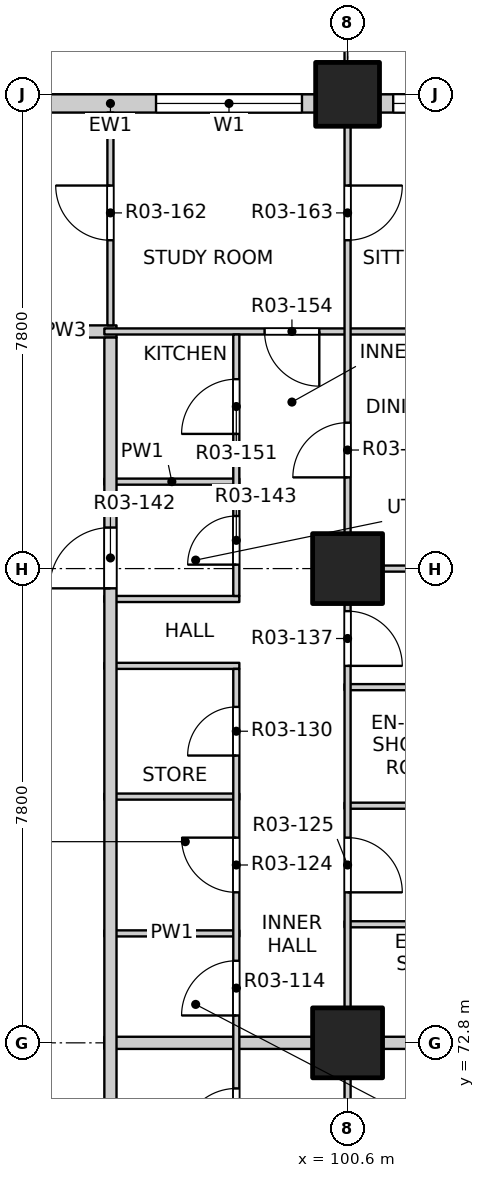
"""IFC4 building model, lengths in metres.
Left out: names, types, materials, properties, quantities, classifications, styles, units other than length and angle.
Written with IfcOpenShell. Run it as: python <this file> out.ifc"""

import sys

from ifc_helpers import new_model, si_unit, direction, frame, frame_2d, origin, origin_2d, place, context, subcontext, project, spatial, rectangle, extrude, element, fill, save


model = new_model("IFC4")
c1 = context("Model", 3, precision=1e-05, world=origin(), true_north=direction((0.0, 1.0)))
c2 = subcontext(c1, "Body", "Model", "MODEL_VIEW")
j1 = project(units=[si_unit("LENGTHUNIT", "METRE"), si_unit("PLANEANGLEUNIT", "RADIAN")], contexts=[c1])
p1 = place(None, origin())
s1 = spatial("IfcSite", under=j1, at=p1, CompositionType="ELEMENT")
p2 = place(p1, origin())
s2 = spatial("IfcBuilding", under=s1, at=p2, CompositionType="ELEMENT")
p3 = place(p2, frame((0.0, 0.0, 39.9)))
s3 = spatial("IfcBuildingStorey", under=s2, at=p3, CompositionType="ELEMENT", Elevation=39.9)
p4 = place(p3, frame((100.6, 88.4, -0.25), z_axis=(0.0, 0.0, 1.0), x_axis=(1.0, 0.0, 0.0)))
e1 = element("IfcColumn", 1, at=p4, inside=s3, PredefinedType="COLUMN", context=c2, shape_type="SweptSolid", body=[
    extrude(rectangle(XDim=1.05, YDim=1.05, at=origin_2d()), origin(), (0.0, 0.0, 1.0), 3.4),
])
for number, where, z_axis, x_axis in (
    (2, (100.6, 72.8, -0.25), (0.0, 0.0, 1.0), (1.0, 0.0, 0.0)),
    (3, (100.6, 80.6, -0.25), (0.0, 0.0, 1.0), (1.0, 0.0, 0.0)),
):
    element("IfcColumn", number, at=place(p3, frame(where, z_axis=z_axis, x_axis=x_axis)), inside=s3, PredefinedType="COLUMN", context=c2, shape_type="SweptSolid", body=[
        extrude(rectangle(XDim=1.15, YDim=1.15, at=origin_2d()), origin(), (0.0, 0.0, 1.0), 3.4),
    ])
p5 = place(p3, frame((93.325, 88.25, 0.0), z_axis=(0.0, 0.0, 1.0), x_axis=(1.0, 0.0, 0.0)))
e4 = element("IfcWall", 4, at=p5, inside=s3, PredefinedType="SOLIDWALL", context=c2, shape_type="SweptSolid", body=[
    extrude(rectangle(XDim=6.75, YDim=0.3, at=frame_2d((3.375, 0.0))), origin(), (0.0, 0.0, 1.0), 2.7),
])
p6 = place(p5, frame((0.525, 0.0, 0.0)))
e5 = element("IfcOpeningElement", 5, at=p6, cuts=e4, PredefinedType="OPENING", context=c2, shape_type="SweptSolid", body=[
    extrude(rectangle(XDim=1.8, YDim=2.4, at=frame_2d((0.9, 1.2))), frame((0.0, 0.16, 0.0), z_axis=(0.0, -1.0, 0.0), x_axis=(1.0, 0.0, 0.0)), (0.0, 0.0, 1.0), 0.32),
])
p7 = place(p5, frame((4.125, 0.0, 0.9)))
e6 = element("IfcOpeningElement", 6, at=p7, cuts=e4, PredefinedType="OPENING", context=c2, shape_type="SweptSolid", body=[
    extrude(rectangle(XDim=2.4, YDim=1.8, at=frame_2d((1.2, 0.9))), frame((0.0, 0.16, 0.0), z_axis=(0.0, -1.0, 0.0), x_axis=(1.0, 0.0, 0.0)), (0.0, 0.0, 1.0), 0.32),
])
p8 = place(p3, frame((101.125, 88.25, 0.0), z_axis=(0.0, 0.0, 1.0), x_axis=(1.0, 0.0, 0.0)))
e7 = element("IfcWall", 7, at=p8, inside=s3, PredefinedType="SOLIDWALL", context=c2, shape_type="SweptSolid", body=[
    extrude(rectangle(XDim=3.375, YDim=0.3, at=frame_2d((1.688, 0.0))), origin(), (0.0, 0.0, 1.0), 2.7),
])
p9 = place(p8, frame((0.225, 0.0, 0.9)))
e8 = element("IfcOpeningElement", 8, at=p9, cuts=e7, PredefinedType="OPENING", context=c2, shape_type="SweptSolid", body=[
    extrude(rectangle(XDim=2.4, YDim=1.8, at=frame_2d((1.2, 0.9))), frame((0.0, 0.16, 0.0), z_axis=(0.0, -1.0, 0.0), x_axis=(1.0, 0.0, 0.0)), (0.0, 0.0, 1.0), 0.32),
])
p10 = place(p3, frame((96.6, 72.8, 0.0), z_axis=(0.0, 0.0, 1.0), x_axis=(1.0, 0.0, 0.0)))
e9 = element("IfcWall", 9, at=p10, inside=s3, PredefinedType="PARTITIONING", context=c2, shape_type="SweptSolid", body=[
    extrude(rectangle(XDim=4.0, YDim=0.2, at=frame_2d((2.0, 0.0))), origin(), (0.0, 0.0, 1.0), 3.15),
])
p11 = place(p3, frame((100.6, 72.8, 0.0), z_axis=(0.0, 0.0, 1.0), x_axis=(1.0, 0.0, 0.0)))
e10 = element("IfcWall", 10, at=p11, inside=s3, PredefinedType="PARTITIONING", context=c2, shape_type="SweptSolid", body=[
    extrude(rectangle(XDim=7.5, YDim=0.2, at=frame_2d((3.75, 0.0))), origin(), (0.0, 0.0, 1.0), 2.55),
])
p12 = place(p3, frame((96.6, 74.6, 0.0), z_axis=(0.0, 0.0, 1.0), x_axis=(1.0, 0.0, 0.0)))
e11 = element("IfcWall", 11, at=p12, inside=s3, PredefinedType="PARTITIONING", context=c2, shape_type="SweptSolid", body=[
    extrude(rectangle(XDim=2.22, YDim=0.1, at=frame_2d((1.11, 0.0))), origin(), (0.0, 0.0, 1.0), 3.15),
])
p13 = place(p3, frame((100.55, 74.75, 0.0), z_axis=(0.0, 0.0, 1.0), x_axis=(1.0, 0.0, 0.0)))
e12 = element("IfcWall", 12, at=p13, inside=s3, PredefinedType="PARTITIONING", context=c2, shape_type="SweptSolid", body=[
    extrude(rectangle(XDim=3.55, YDim=0.1, at=frame_2d((1.775, 0.0))), origin(), (0.0, 0.0, 1.0), 3.15),
])
p14 = place(p3, frame((100.55, 76.7, 0.0), z_axis=(0.0, 0.0, 1.0), x_axis=(1.0, 0.0, 0.0)))
e13 = element("IfcWall", 13, at=p14, inside=s3, PredefinedType="PARTITIONING", context=c2, shape_type="SweptSolid", body=[
    extrude(rectangle(XDim=7.55, YDim=0.1, at=frame_2d((3.775, 0.0))), origin(), (0.0, 0.0, 1.0), 3.15),
])
p15 = place(p3, frame((96.6, 76.85, 0.0), z_axis=(0.0, 0.0, 1.0), x_axis=(1.0, 0.0, 0.0)))
e14 = element("IfcWall", 14, at=p15, inside=s3, PredefinedType="PARTITIONING", context=c2, shape_type="SweptSolid", body=[
    extrude(rectangle(XDim=2.22, YDim=0.1, at=frame_2d((1.11, 0.0))), origin(), (0.0, 0.0, 1.0), 3.15),
])
p16 = place(p3, frame((100.55, 78.65, 0.0), z_axis=(0.0, 0.0, 1.0), x_axis=(1.0, 0.0, 0.0)))
e15 = element("IfcWall", 15, at=p16, inside=s3, PredefinedType="PARTITIONING", context=c2, shape_type="SweptSolid", body=[
    extrude(rectangle(XDim=3.55, YDim=0.1, at=frame_2d((1.775, 0.0))), origin(), (0.0, 0.0, 1.0), 3.15),
])
for number, where, z_axis, x_axis in (
    (16, (96.6, 79.0, 0.0), (0.0, 0.0, 1.0), (1.0, 0.0, 0.0)),
    (17, (96.6, 80.1, 0.0), (0.0, 0.0, 1.0), (1.0, 0.0, 0.0)),
):
    element("IfcWall", number, at=place(p3, frame(where, z_axis=z_axis, x_axis=x_axis)), inside=s3, PredefinedType="PARTITIONING", context=c2, shape_type="SweptSolid", body=[
        extrude(rectangle(XDim=2.22, YDim=0.1, at=frame_2d((1.11, 0.0))), origin(), (0.0, 0.0, 1.0), 3.15),
    ])
p17 = place(p3, frame((100.55, 80.6, 0.0), z_axis=(0.0, 0.0, 1.0), x_axis=(1.0, 0.0, 0.0)))
e18 = element("IfcWall", 18, at=p17, inside=s3, PredefinedType="PARTITIONING", context=c2, shape_type="SweptSolid", body=[
    extrude(rectangle(XDim=7.55, YDim=0.1, at=frame_2d((3.775, 0.0))), origin(), (0.0, 0.0, 1.0), 2.55),
])
p18 = place(p3, frame((96.6, 82.03, 0.0), z_axis=(0.0, 0.0, 1.0), x_axis=(1.0, 0.0, 0.0)))
e19 = element("IfcWall", 19, at=p18, inside=s3, PredefinedType="PARTITIONING", context=c2, shape_type="SweptSolid", body=[
    extrude(rectangle(XDim=2.22, YDim=0.1, at=frame_2d((1.11, 0.0))), origin(), (0.0, 0.0, 1.0), 3.15),
])
p19 = place(p3, frame((95.1, 84.5, 0.0), z_axis=(0.0, 0.0, 1.0), x_axis=(1.0, 0.0, 0.0)))
e20 = element("IfcWall", 20, at=p19, inside=s3, PredefinedType="PARTITIONING", context=c2, shape_type="SweptSolid", body=[
    extrude(rectangle(XDim=1.7, YDim=0.2, at=frame_2d((0.85, 0.0))), origin(), (0.0, 0.0, 1.0), 3.15),
])
p20 = place(p3, frame((96.6, 84.5, 0.0), z_axis=(0.0, 0.0, 1.0), x_axis=(1.0, 0.0, 0.0)))
e21 = element("IfcWall", 21, at=p20, inside=s3, PredefinedType="PARTITIONING", context=c2, shape_type="SweptSolid", body=[
    extrude(rectangle(XDim=11.5, YDim=0.1, at=frame_2d((5.75, 0.0))), origin(), (0.0, 0.0, 1.0), 3.15),
])
p21 = place(p20, frame((2.635, 0.0, 0.0)))
e22 = element("IfcOpeningElement", 22, at=p21, cuts=e21, PredefinedType="OPENING", context=c2, shape_type="SweptSolid", body=[
    extrude(rectangle(XDim=0.9, YDim=2.1, at=frame_2d((0.45, 1.05))), frame((0.0, 0.06, 0.0), z_axis=(0.0, -1.0, 0.0), x_axis=(1.0, 0.0, 0.0)), (0.0, 0.0, 1.0), 0.12),
])
p22 = place(p3, frame((96.7, 53.4, 0.0), z_axis=(0.0, 0.0, 1.0), x_axis=(0.0, 1.0, 0.0)))
e23 = element("IfcWall", 23, at=p22, inside=s3, PredefinedType="PARTITIONING", context=c2, shape_type="SweptSolid", body=[
    extrude(rectangle(XDim=31.0, YDim=0.2, at=frame_2d((15.5, 0.0))), origin(), (0.0, 0.0, 1.0), 3.15),
])
p23 = place(p22, frame((3.325, 0.0, 0.0)))
e24 = element("IfcOpeningElement", 24, at=p23, cuts=e23, PredefinedType="OPENING", context=c2, shape_type="SweptSolid", body=[
    extrude(rectangle(XDim=1.0, YDim=2.1, at=frame_2d((0.5, 1.05))), frame((0.0, 0.11, 0.0), z_axis=(0.0, -1.0, 0.0), x_axis=(1.0, 0.0, 0.0)), (0.0, 0.0, 1.0), 0.22),
])
p24 = place(p22, frame((11.125, 0.0, 0.0)))
e25 = element("IfcOpeningElement", 25, at=p24, cuts=e23, PredefinedType="OPENING", context=c2, shape_type="SweptSolid", body=[
    extrude(rectangle(XDim=1.0, YDim=2.1, at=frame_2d((0.5, 1.05))), frame((0.0, 0.11, 0.0), z_axis=(0.0, -1.0, 0.0), x_axis=(1.0, 0.0, 0.0)), (0.0, 0.0, 1.0), 0.22),
])
p25 = place(p22, frame((26.875, 0.0, 0.0)))
e26 = element("IfcOpeningElement", 26, at=p25, cuts=e23, PredefinedType="OPENING", context=c2, shape_type="SweptSolid", body=[
    extrude(rectangle(XDim=1.0, YDim=2.1, at=frame_2d((0.5, 1.05))), frame((0.0, 0.11, 0.0), z_axis=(0.0, -1.0, 0.0), x_axis=(1.0, 0.0, 0.0)), (0.0, 0.0, 1.0), 0.22),
])
p26 = place(p3, frame((96.7, 84.6, 0.0), z_axis=(0.0, 0.0, 1.0), x_axis=(0.0, 1.0, 0.0)))
e27 = element("IfcWall", 27, at=p26, inside=s3, PredefinedType="PARTITIONING", context=c2, shape_type="SweptSolid", body=[
    extrude(rectangle(XDim=3.5, YDim=0.1, at=frame_2d((1.75, 0.0))), origin(), (0.0, 0.0, 1.0), 3.15),
])
p27 = place(p26, frame((1.4, 0.0, 0.0)))
e28 = element("IfcOpeningElement", 28, at=p27, cuts=e27, PredefinedType="OPENING", context=c2, shape_type="SweptSolid", body=[
    extrude(rectangle(XDim=0.9, YDim=2.1, at=frame_2d((0.45, 1.05))), frame((0.0, 0.06, 0.0), z_axis=(0.0, -1.0, 0.0), x_axis=(1.0, 0.0, 0.0)), (0.0, 0.0, 1.0), 0.12),
])
p28 = place(p3, frame((98.77, 64.4, 0.0), z_axis=(0.0, 0.0, 1.0), x_axis=(0.0, 1.0, 0.0)))
e29 = element("IfcWall", 29, at=p28, inside=s3, PredefinedType="PARTITIONING", context=c2, shape_type="SweptSolid", body=[
    extrude(rectangle(XDim=14.55, YDim=0.1, at=frame_2d((7.275, 0.0))), origin(), (0.0, 0.0, 1.0), 3.15),
])
p29 = place(p28, frame((1.11, 0.0, 0.0)))
e30 = element("IfcOpeningElement", 30, at=p29, cuts=e29, PredefinedType="OPENING", context=c2, shape_type="SweptSolid", body=[
    extrude(rectangle(XDim=0.9, YDim=2.1, at=frame_2d((0.45, 1.05))), frame((0.0, 0.06, 0.0), z_axis=(0.0, -1.0, 0.0), x_axis=(1.0, 0.0, 0.0)), (0.0, 0.0, 1.0), 0.12),
])
p30 = place(p28, frame((4.185, 0.0, 0.0)))
e31 = element("IfcOpeningElement", 31, at=p30, cuts=e29, PredefinedType="OPENING", context=c2, shape_type="SweptSolid", body=[
    extrude(rectangle(XDim=0.8, YDim=2.1, at=frame_2d((0.4, 1.05))), frame((0.0, 0.06, 0.0), z_axis=(0.0, -1.0, 0.0), x_axis=(1.0, 0.0, 0.0)), (0.0, 0.0, 1.0), 0.12),
])
p31 = place(p28, frame((6.75, 0.0, 0.0)))
e32 = element("IfcOpeningElement", 32, at=p31, cuts=e29, PredefinedType="OPENING", context=c2, shape_type="SweptSolid", body=[
    extrude(rectangle(XDim=0.9, YDim=2.1, at=frame_2d((0.45, 1.05))), frame((0.0, 0.06, 0.0), z_axis=(0.0, -1.0, 0.0), x_axis=(1.0, 0.0, 0.0)), (0.0, 0.0, 1.0), 0.12),
])
p32 = place(p28, frame((8.85, 0.0, 0.0)))
e33 = element("IfcOpeningElement", 33, at=p32, cuts=e29, PredefinedType="OPENING", context=c2, shape_type="SweptSolid", body=[
    extrude(rectangle(XDim=0.9, YDim=2.1, at=frame_2d((0.45, 1.05))), frame((0.0, 0.06, 0.0), z_axis=(0.0, -1.0, 0.0), x_axis=(1.0, 0.0, 0.0)), (0.0, 0.0, 1.0), 0.12),
])
p33 = place(p28, frame((10.875, 0.0, 0.0)))
e34 = element("IfcOpeningElement", 34, at=p33, cuts=e29, PredefinedType="OPENING", context=c2, shape_type="SweptSolid", body=[
    extrude(rectangle(XDim=0.9, YDim=2.1, at=frame_2d((0.45, 1.05))), frame((0.0, 0.06, 0.0), z_axis=(0.0, -1.0, 0.0), x_axis=(1.0, 0.0, 0.0)), (0.0, 0.0, 1.0), 0.12),
])
p34 = place(p28, frame((13.125, 0.0, 0.0)))
e35 = element("IfcOpeningElement", 35, at=p34, cuts=e29, PredefinedType="OPENING", context=c2, shape_type="SweptSolid", body=[
    extrude(rectangle(XDim=0.8, YDim=2.1, at=frame_2d((0.4, 1.05))), frame((0.0, 0.06, 0.0), z_axis=(0.0, -1.0, 0.0), x_axis=(1.0, 0.0, 0.0)), (0.0, 0.0, 1.0), 0.12),
])
p35 = place(p3, frame((98.77, 80.15, 0.0), z_axis=(0.0, 0.0, 1.0), x_axis=(0.0, 1.0, 0.0)))
e36 = element("IfcWall", 36, at=p35, inside=s3, PredefinedType="PARTITIONING", context=c2, shape_type="SweptSolid", body=[
    extrude(rectangle(XDim=4.3, YDim=0.1, at=frame_2d((2.15, 0.0))), origin(), (0.0, 0.0, 1.0), 3.15),
])
p36 = place(p35, frame((0.515, 0.0, 0.0)))
e37 = element("IfcOpeningElement", 37, at=p36, cuts=e36, PredefinedType="OPENING", context=c2, shape_type="SweptSolid", body=[
    extrude(rectangle(XDim=0.8, YDim=2.1, at=frame_2d((0.4, 1.05))), frame((0.0, 0.06, 0.0), z_axis=(0.0, -1.0, 0.0), x_axis=(1.0, 0.0, 0.0)), (0.0, 0.0, 1.0), 0.12),
])
p37 = place(p35, frame((2.665, 0.0, 0.0)))
e38 = element("IfcOpeningElement", 38, at=p37, cuts=e36, PredefinedType="OPENING", context=c2, shape_type="SweptSolid", body=[
    extrude(rectangle(XDim=0.9, YDim=2.1, at=frame_2d((0.45, 1.05))), frame((0.0, 0.06, 0.0), z_axis=(0.0, -1.0, 0.0), x_axis=(1.0, 0.0, 0.0)), (0.0, 0.0, 1.0), 0.12),
])
p38 = place(p3, frame((100.6, 49.4, 0.0), z_axis=(0.0, 0.0, 1.0), x_axis=(0.0, 1.0, 0.0)))
e39 = element("IfcWall", 39, at=p38, inside=s3, PredefinedType="PARTITIONING", context=c2, shape_type="SweptSolid", body=[
    extrude(rectangle(XDim=31.2, YDim=0.1, at=frame_2d((15.6, 0.0))), origin(), (0.0, 0.0, 1.0), 3.15),
])
p39 = place(p38, frame((1.5, 0.0, 0.0)))
e40 = element("IfcOpeningElement", 40, at=p39, cuts=e39, PredefinedType="OPENING", context=c2, shape_type="SweptSolid", body=[
    extrude(rectangle(XDim=0.9, YDim=2.1, at=frame_2d((0.45, 1.05))), frame((0.0, 0.06, 0.0), z_axis=(0.0, -1.0, 0.0), x_axis=(1.0, 0.0, 0.0)), (0.0, 0.0, 1.0), 0.12),
])
p40 = place(p38, frame((6.225, 0.0, 0.0)))
e41 = element("IfcOpeningElement", 41, at=p40, cuts=e39, PredefinedType="OPENING", context=c2, shape_type="SweptSolid", body=[
    extrude(rectangle(XDim=0.9, YDim=2.1, at=frame_2d((0.45, 1.05))), frame((0.0, 0.06, 0.0), z_axis=(0.0, -1.0, 0.0), x_axis=(1.0, 0.0, 0.0)), (0.0, 0.0, 1.0), 0.12),
])
p41 = place(p38, frame((10.275, 0.0, 0.0)))
e42 = element("IfcOpeningElement", 42, at=p41, cuts=e39, PredefinedType="OPENING", context=c2, shape_type="SweptSolid", body=[
    extrude(rectangle(XDim=0.9, YDim=2.1, at=frame_2d((0.45, 1.05))), frame((0.0, 0.06, 0.0), z_axis=(0.0, -1.0, 0.0), x_axis=(1.0, 0.0, 0.0)), (0.0, 0.0, 1.0), 0.12),
])
p42 = place(p38, frame((14.0, 0.0, 0.0)))
e43 = element("IfcOpeningElement", 43, at=p42, cuts=e39, PredefinedType="OPENING", context=c2, shape_type="SweptSolid", body=[
    extrude(rectangle(XDim=0.9, YDim=2.1, at=frame_2d((0.45, 1.05))), frame((0.0, 0.06, 0.0), z_axis=(0.0, -1.0, 0.0), x_axis=(1.0, 0.0, 0.0)), (0.0, 0.0, 1.0), 0.12),
])
p43 = place(p38, frame((17.1, 0.0, 0.0)))
e44 = element("IfcOpeningElement", 44, at=p43, cuts=e39, PredefinedType="OPENING", context=c2, shape_type="SweptSolid", body=[
    extrude(rectangle(XDim=0.9, YDim=2.1, at=frame_2d((0.45, 1.05))), frame((0.0, 0.06, 0.0), z_axis=(0.0, -1.0, 0.0), x_axis=(1.0, 0.0, 0.0)), (0.0, 0.0, 1.0), 0.12),
])
p44 = place(p38, frame((21.0, 0.0, 0.0)))
e45 = element("IfcOpeningElement", 45, at=p44, cuts=e39, PredefinedType="OPENING", context=c2, shape_type="SweptSolid", body=[
    extrude(rectangle(XDim=0.9, YDim=2.1, at=frame_2d((0.45, 1.05))), frame((0.0, 0.06, 0.0), z_axis=(0.0, -1.0, 0.0), x_axis=(1.0, 0.0, 0.0)), (0.0, 0.0, 1.0), 0.12),
])
p45 = place(p38, frame((25.875, 0.0, 0.0)))
e46 = element("IfcOpeningElement", 46, at=p45, cuts=e39, PredefinedType="OPENING", context=c2, shape_type="SweptSolid", body=[
    extrude(rectangle(XDim=0.9, YDim=2.1, at=frame_2d((0.45, 1.05))), frame((0.0, 0.06, 0.0), z_axis=(0.0, -1.0, 0.0), x_axis=(1.0, 0.0, 0.0)), (0.0, 0.0, 1.0), 0.12),
])
p46 = place(p38, frame((29.6, 0.0, 0.0)))
e47 = element("IfcOpeningElement", 47, at=p46, cuts=e39, PredefinedType="OPENING", context=c2, shape_type="SweptSolid", body=[
    extrude(rectangle(XDim=0.9, YDim=2.1, at=frame_2d((0.45, 1.05))), frame((0.0, 0.06, 0.0), z_axis=(0.0, -1.0, 0.0), x_axis=(1.0, 0.0, 0.0)), (0.0, 0.0, 1.0), 0.12),
])
p47 = place(p3, frame((100.6, 80.6, 0.0), z_axis=(0.0, 0.0, 1.0), x_axis=(0.0, 1.0, 0.0)))
e48 = element("IfcWall", 48, at=p47, inside=s3, PredefinedType="PARTITIONING", context=c2, shape_type="SweptSolid", body=[
    extrude(rectangle(XDim=7.5, YDim=0.1, at=frame_2d((3.75, 0.0))), origin(), (0.0, 0.0, 1.0), 2.55),
])
p48 = place(p47, frame((1.5, 0.0, 0.0)))
e49 = element("IfcOpeningElement", 49, at=p48, cuts=e48, PredefinedType="OPENING", context=c2, shape_type="SweptSolid", body=[
    extrude(rectangle(XDim=0.9, YDim=2.1, at=frame_2d((0.45, 1.05))), frame((0.0, 0.06, 0.0), z_axis=(0.0, -1.0, 0.0), x_axis=(1.0, 0.0, 0.0)), (0.0, 0.0, 1.0), 0.12),
])
p49 = place(p47, frame((5.4, 0.0, 0.0)))
e50 = element("IfcOpeningElement", 50, at=p49, cuts=e48, PredefinedType="OPENING", context=c2, shape_type="SweptSolid", body=[
    extrude(rectangle(XDim=0.9, YDim=2.1, at=frame_2d((0.45, 1.05))), frame((0.0, 0.06, 0.0), z_axis=(0.0, -1.0, 0.0), x_axis=(1.0, 0.0, 0.0)), (0.0, 0.0, 1.0), 0.12),
])
p50 = place(p7, origin())
e51 = element("IfcWindow", 51, at=p50, inside=s3, PartitioningType="DOUBLE_PANEL_VERTICAL", PredefinedType="WINDOW", context=c2, shape_type="SweptSolid", body=[
    extrude(rectangle(XDim=2.4, YDim=1.8, at=frame_2d((1.2, 0.9))), frame((0.0, 0.03, 0.0), z_axis=(0.0, -1.0, 0.0), x_axis=(1.0, 0.0, 0.0)), (0.0, 0.0, 1.0), 0.06),
])
fill(e6, e51)
p51 = place(p9, origin())
e52 = element("IfcWindow", 52, at=p51, inside=s3, PartitioningType="DOUBLE_PANEL_VERTICAL", PredefinedType="WINDOW", context=c2, shape_type="SweptSolid", body=[
    extrude(rectangle(XDim=2.4, YDim=1.8, at=frame_2d((1.2, 0.9))), frame((0.0, 0.03, 0.0), z_axis=(0.0, -1.0, 0.0), x_axis=(1.0, 0.0, 0.0)), (0.0, 0.0, 1.0), 0.06),
])
fill(e8, e52)
p52 = place(p31, origin())
e53 = element("IfcDoor", 53, at=p52, inside=s3, OperationType="SINGLE_SWING_LEFT", PredefinedType="DOOR", context=c2, shape_type="SweptSolid", body=[
    extrude(rectangle(XDim=0.9, YDim=2.1, at=frame_2d((0.45, 1.05))), frame((0.0, 0.025, 0.0), z_axis=(0.0, -1.0, 0.0), x_axis=(1.0, 0.0, 0.0)), (0.0, 0.0, 1.0), 0.05),
])
fill(e32, e53)
p53 = place(p32, origin())
e54 = element("IfcDoor", 54, at=p53, inside=s3, OperationType="SINGLE_SWING_LEFT", PredefinedType="DOOR", context=c2, shape_type="SweptSolid", body=[
    extrude(rectangle(XDim=0.9, YDim=2.1, at=frame_2d((0.45, 1.05))), frame((0.0, 0.025, 0.0), z_axis=(0.0, -1.0, 0.0), x_axis=(1.0, 0.0, 0.0)), (0.0, 0.0, 1.0), 0.05),
])
fill(e33, e54)
p54 = place(p33, origin())
e55 = element("IfcDoor", 55, at=p54, inside=s3, OperationType="SINGLE_SWING_RIGHT", PredefinedType="DOOR", context=c2, shape_type="SweptSolid", body=[
    extrude(rectangle(XDim=0.9, YDim=2.1, at=frame_2d((0.45, 1.05))), frame((0.0, 0.025, 0.0), z_axis=(0.0, -1.0, 0.0), x_axis=(1.0, 0.0, 0.0)), (0.0, 0.0, 1.0), 0.05),
])
fill(e34, e55)
p55 = place(p45, origin())
e56 = element("IfcDoor", 56, at=p55, inside=s3, OperationType="SINGLE_SWING_RIGHT", PredefinedType="DOOR", context=c2, shape_type="SweptSolid", body=[
    extrude(rectangle(XDim=0.9, YDim=2.1, at=frame_2d((0.45, 1.05))), frame((0.0, 0.025, 0.0), z_axis=(0.0, -1.0, 0.0), x_axis=(1.0, 0.0, 0.0)), (0.0, 0.0, 1.0), 0.05),
])
fill(e46, e56)
p56 = place(p34, origin())
e57 = element("IfcDoor", 57, at=p56, inside=s3, OperationType="SINGLE_SWING_LEFT", PredefinedType="DOOR", context=c2, shape_type="SweptSolid", body=[
    extrude(rectangle(XDim=0.8, YDim=2.1, at=frame_2d((0.4, 1.05))), frame((0.0, 0.025, 0.0), z_axis=(0.0, -1.0, 0.0), x_axis=(1.0, 0.0, 0.0)), (0.0, 0.0, 1.0), 0.05),
])
fill(e35, e57)
p57 = place(p46, origin())
e58 = element("IfcDoor", 58, at=p57, inside=s3, OperationType="SINGLE_SWING_RIGHT", PredefinedType="DOOR", context=c2, shape_type="SweptSolid", body=[
    extrude(rectangle(XDim=0.9, YDim=2.1, at=frame_2d((0.45, 1.05))), frame((0.0, 0.025, 0.0), z_axis=(0.0, -1.0, 0.0), x_axis=(1.0, 0.0, 0.0)), (0.0, 0.0, 1.0), 0.05),
])
fill(e47, e58)
p58 = place(p25, origin())
e59 = element("IfcDoor", 59, at=p58, inside=s3, OperationType="SINGLE_SWING_LEFT", PredefinedType="DOOR", context=c2, shape_type="SweptSolid", body=[
    extrude(rectangle(XDim=1.0, YDim=2.1, at=frame_2d((0.5, 1.05))), frame((0.0, 0.025, 0.0), z_axis=(0.0, -1.0, 0.0), x_axis=(1.0, 0.0, 0.0)), (0.0, 0.0, 1.0), 0.05),
])
fill(e26, e59)
p59 = place(p36, origin())
e60 = element("IfcDoor", 60, at=p59, inside=s3, OperationType="SINGLE_SWING_LEFT", PredefinedType="DOOR", context=c2, shape_type="SweptSolid", body=[
    extrude(rectangle(XDim=0.8, YDim=2.1, at=frame_2d((0.4, 1.05))), frame((0.0, 0.025, 0.0), z_axis=(0.0, -1.0, 0.0), x_axis=(1.0, 0.0, 0.0)), (0.0, 0.0, 1.0), 0.05),
])
fill(e37, e60)
p60 = place(p48, origin())
e61 = element("IfcDoor", 61, at=p60, inside=s3, OperationType="SINGLE_SWING_LEFT", PredefinedType="DOOR", context=c2, shape_type="SweptSolid", body=[
    extrude(rectangle(XDim=0.9, YDim=2.1, at=frame_2d((0.45, 1.05))), frame((0.0, 0.025, 0.0), z_axis=(0.0, -1.0, 0.0), x_axis=(1.0, 0.0, 0.0)), (0.0, 0.0, 1.0), 0.05),
])
fill(e49, e61)
p61 = place(p37, origin())
e62 = element("IfcDoor", 62, at=p61, inside=s3, OperationType="SINGLE_SWING_LEFT", PredefinedType="DOOR", context=c2, shape_type="SweptSolid", body=[
    extrude(rectangle(XDim=0.9, YDim=2.1, at=frame_2d((0.45, 1.05))), frame((0.0, 0.025, 0.0), z_axis=(0.0, -1.0, 0.0), x_axis=(1.0, 0.0, 0.0)), (0.0, 0.0, 1.0), 0.05),
])
fill(e38, e62)
p62 = place(p21, origin())
e63 = element("IfcDoor", 63, at=p62, inside=s3, OperationType="SINGLE_SWING_LEFT", PredefinedType="DOOR", context=c2, shape_type="SweptSolid", body=[
    extrude(rectangle(XDim=0.9, YDim=2.1, at=frame_2d((0.45, 1.05))), frame((0.0, 0.025, 0.0), z_axis=(0.0, -1.0, 0.0), x_axis=(1.0, 0.0, 0.0)), (0.0, 0.0, 1.0), 0.05),
])
fill(e22, e63)
p63 = place(p27, origin())
e64 = element("IfcDoor", 64, at=p63, inside=s3, OperationType="SINGLE_SWING_RIGHT", PredefinedType="DOOR", context=c2, shape_type="SweptSolid", body=[
    extrude(rectangle(XDim=0.9, YDim=2.1, at=frame_2d((0.45, 1.05))), frame((0.0, 0.025, 0.0), z_axis=(0.0, -1.0, 0.0), x_axis=(1.0, 0.0, 0.0)), (0.0, 0.0, 1.0), 0.05),
])
fill(e28, e64)
p64 = place(p49, origin())
e65 = element("IfcDoor", 65, at=p64, inside=s3, OperationType="SINGLE_SWING_LEFT", PredefinedType="DOOR", context=c2, shape_type="SweptSolid", body=[
    extrude(rectangle(XDim=0.9, YDim=2.1, at=frame_2d((0.45, 1.05))), frame((0.0, 0.025, 0.0), z_axis=(0.0, -1.0, 0.0), x_axis=(1.0, 0.0, 0.0)), (0.0, 0.0, 1.0), 0.05),
])
fill(e50, e65)
save(model, sys.argv[1])
